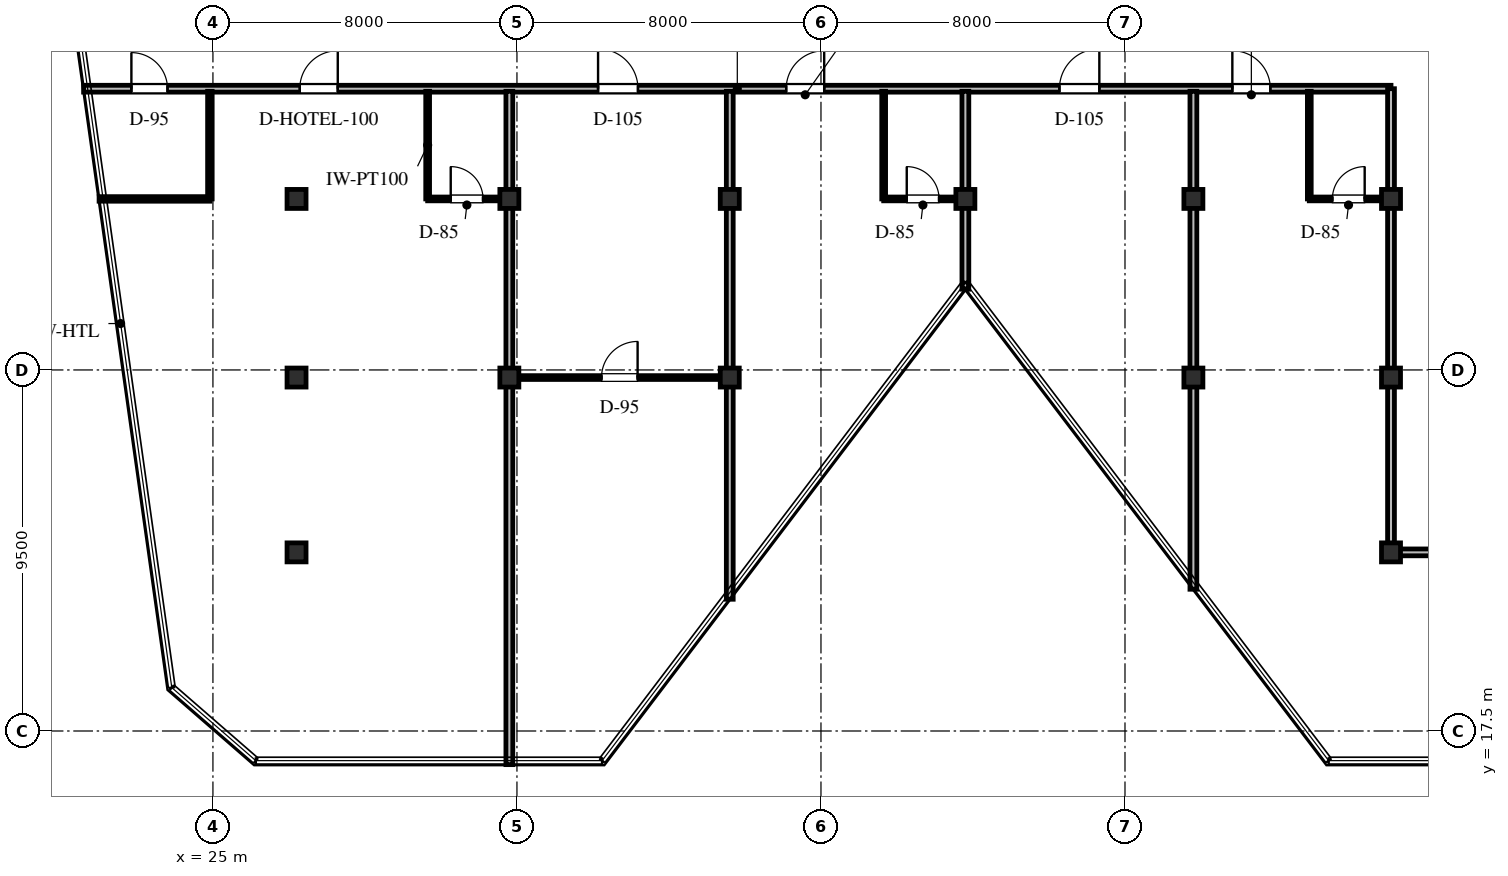
"""IFC4 building model, lengths in metres.
Left out: names, types, materials, properties, quantities, classifications, styles, units other than length and angle.
Written with IfcOpenShell. Run it as: python <this file> out.ifc"""

import sys

from ifc_helpers import new_model, si_unit, direction, frame, frame_2d, origin, origin_2d, place, context, subcontext, project, spatial, rectangle, hollow_rectangle, extrude, element, fill, save


model = new_model("IFC4")
c1 = context("Model", 3, precision=1e-05, world=origin(), true_north=direction((0.0, 1.0)))
c2 = subcontext(c1, "Body", "Model", "MODEL_VIEW")
j1 = project(units=[si_unit("LENGTHUNIT", "METRE"), si_unit("PLANEANGLEUNIT", "RADIAN")], contexts=[c1])
p1 = place(None, origin())
s1 = spatial("IfcSite", under=j1, at=p1, CompositionType="ELEMENT")
p2 = place(p1, origin())
s2 = spatial("IfcBuilding", under=s1, at=p2, CompositionType="ELEMENT")
p3 = place(p2, frame((0.0, 0.0, 234.6)))
s3 = spatial("IfcBuildingStorey", under=s2, at=p3, CompositionType="ELEMENT", Elevation=234.6)
for number, where, z_axis, x_axis in (
    (1, (44.8, 31.5, 0.0), (0.0, 0.0, 1.0), (1.0, 0.0, 0.0)),
    (2, (50.8, 31.5, 0.0), (0.0, 0.0, 1.0), (1.0, 0.0, 0.0)),
    (3, (56.0, 31.5, 0.0), (0.0, 0.0, 1.0), (1.0, 0.0, 0.0)),
    (4, (38.6, 31.5, 0.0), (0.0, 0.0, 1.0), (1.0, 0.0, 0.0)),
    (5, (32.8, 31.5, 0.0), (0.0, 0.0, 1.0), (1.0, 0.0, 0.0)),
    (6, (27.2, 31.5, 0.0), (0.0, 0.0, 1.0), (1.0, 0.0, 0.0)),
    (7, (38.6, 26.8, 0.0), (0.0, 0.0, 1.0), (1.0, 0.0, 0.0)),
    (8, (50.8, 26.8, 0.0), (0.0, 0.0, 1.0), (1.0, 0.0, 0.0)),
    (9, (56.0, 26.8, 0.0), (0.0, 0.0, 1.0), (1.0, 0.0, 0.0)),
    (10, (56.0, 22.2, 0.0), (0.0, 0.0, 1.0), (1.0, 0.0, 0.0)),
    (11, (27.2, 22.2, 0.0), (0.0, 0.0, 1.0), (1.0, 0.0, 0.0)),
    (12, (27.2, 26.8, 0.0), (0.0, 0.0, 1.0), (1.0, 0.0, 0.0)),
    (13, (32.8, 26.8, 0.0), (0.0, 0.0, 1.0), (1.0, 0.0, 0.0)),
):
    element("IfcColumn", number, at=place(p3, frame(where, z_axis=z_axis, x_axis=x_axis)), inside=s3, PredefinedType="COLUMN", context=c2, shape_type="SweptSolid", body=[
        extrude(hollow_rectangle(XDim=0.5, YDim=0.5, WallThickness=0.02, at=origin_2d()), origin(), (0.0, 0.0, 1.0), 3.6),
    ])
p4 = place(p3, frame((21.597, 34.4, 0.0), z_axis=(0.0, 0.0, 1.0), x_axis=(1.0, 0.0, 0.0)))
e14 = element("IfcWall", 14, at=p4, inside=s3, PredefinedType="STANDARD", context=c2, shape_type="SweptSolid", body=[
    extrude(rectangle(XDim=34.403, YDim=0.18, at=frame_2d((17.202, 0.0))), origin(), (0.0, 0.0, 1.0), 2.664),
])
p5 = place(p4, frame((1.258, 0.0, 0.0)))
e15 = element("IfcOpeningElement", 15, at=p5, cuts=e14, PredefinedType="OPENING", context=c2, shape_type="SweptSolid", body=[
    extrude(rectangle(XDim=0.95, YDim=2.15, at=frame_2d((0.475, 1.075))), frame((0.0, 0.1, 0.0), z_axis=(0.0, -1.0, 0.0), x_axis=(1.0, 0.0, 0.0)), (0.0, 0.0, 1.0), 0.2),
])
p6 = place(p4, frame((5.688, 0.0, 0.0)))
e16 = element("IfcOpeningElement", 16, at=p6, cuts=e14, PredefinedType="OPENING", context=c2, shape_type="SweptSolid", body=[
    extrude(rectangle(XDim=1.0, YDim=2.15, at=frame_2d((0.5, 1.075))), frame((0.0, 0.1, 0.0), z_axis=(0.0, -1.0, 0.0), x_axis=(1.0, 0.0, 0.0)), (0.0, 0.0, 1.0), 0.2),
])
p7 = place(p4, frame((13.538, 0.0, 0.0)))
e17 = element("IfcOpeningElement", 17, at=p7, cuts=e14, PredefinedType="OPENING", context=c2, shape_type="SweptSolid", body=[
    extrude(rectangle(XDim=1.05, YDim=2.2, at=frame_2d((0.525, 1.1))), frame((0.0, 0.1, 0.0), z_axis=(0.0, -1.0, 0.0), x_axis=(1.0, 0.0, 0.0)), (0.0, 0.0, 1.0), 0.2),
])
p8 = place(p4, frame((18.488, 0.0, 0.0)))
e18 = element("IfcOpeningElement", 18, at=p8, cuts=e14, PredefinedType="OPENING", context=c2, shape_type="SweptSolid", body=[
    extrude(rectangle(XDim=1.0, YDim=2.15, at=frame_2d((0.5, 1.075))), frame((0.0, 0.1, 0.0), z_axis=(0.0, -1.0, 0.0), x_axis=(1.0, 0.0, 0.0)), (0.0, 0.0, 1.0), 0.2),
])
p9 = place(p4, frame((25.678, 0.0, 0.0)))
e19 = element("IfcOpeningElement", 19, at=p9, cuts=e14, PredefinedType="OPENING", context=c2, shape_type="SweptSolid", body=[
    extrude(rectangle(XDim=1.05, YDim=2.2, at=frame_2d((0.525, 1.1))), frame((0.0, 0.1, 0.0), z_axis=(0.0, -1.0, 0.0), x_axis=(1.0, 0.0, 0.0)), (0.0, 0.0, 1.0), 0.2),
])
p10 = place(p4, frame((30.228, 0.0, 0.0)))
e20 = element("IfcOpeningElement", 20, at=p10, cuts=e14, PredefinedType="OPENING", context=c2, shape_type="SweptSolid", body=[
    extrude(rectangle(XDim=1.0, YDim=2.15, at=frame_2d((0.5, 1.075))), frame((0.0, 0.1, 0.0), z_axis=(0.0, -1.0, 0.0), x_axis=(1.0, 0.0, 0.0)), (0.0, 0.0, 1.0), 0.2),
])
p11 = place(p3, frame((56.0, 22.2, 0.0), z_axis=(0.0, 0.0, 1.0), x_axis=(0.0, 1.0, 0.0)))
e21 = element("IfcWall", 21, at=p11, inside=s3, PredefinedType="STANDARD", context=c2, shape_type="SweptSolid", body=[
    extrude(rectangle(XDim=12.2, YDim=0.18, at=frame_2d((6.1, 0.0))), origin(), (0.0, 0.0, 1.0), 2.664),
])
p12 = place(p3, frame((56.0, 22.2, 0.0), z_axis=(0.0, 0.0, 1.0), x_axis=(1.0, 0.0, 0.0)))
e22 = element("IfcWall", 22, at=p12, inside=s3, PredefinedType="STANDARD", context=c2, shape_type="SweptSolid", body=[
    extrude(rectangle(XDim=2.25, YDim=0.18, at=frame_2d((1.125, 0.0))), origin(), (0.0, 0.0, 1.0), 2.664),
])
p13 = place(p3, frame((24.92, 31.5, 0.0), z_axis=(0.0, 0.0, 1.0), x_axis=(0.0, 1.0, 0.0)))
e23 = element("IfcWall", 23, at=p13, inside=s3, PredefinedType="PARTITIONING", context=c2, shape_type="SweptSolid", body=[
    extrude(rectangle(XDim=2.832, YDim=0.12, at=frame_2d((1.416, 0.0))), origin(), (0.0, 0.0, 1.0), 3.36),
])
p14 = place(p3, frame((22.004, 31.5, 0.0), z_axis=(0.0, 0.0, 1.0), x_axis=(1.0, 0.0, 0.0)))
e24 = element("IfcWall", 24, at=p14, inside=s3, PredefinedType="PARTITIONING", context=c2, shape_type="SweptSolid", body=[
    extrude(rectangle(XDim=2.916, YDim=0.12, at=frame_2d((1.458, 0.0))), origin(), (0.0, 0.0, 1.0), 3.36),
])
p15 = place(p3, frame((30.65, 31.5, 0.0), z_axis=(0.0, 0.0, 1.0), x_axis=(0.0, 1.0, 0.0)))
e25 = element("IfcWall", 25, at=p15, inside=s3, PredefinedType="PARTITIONING", context=c2, shape_type="SweptSolid", body=[
    extrude(rectangle(XDim=2.832, YDim=0.1, at=frame_2d((1.416, 0.0))), origin(), (0.0, 0.0, 1.0), 2.664),
])
p16 = place(p3, frame((30.65, 31.5, 0.0), z_axis=(0.0, 0.0, 1.0), x_axis=(1.0, 0.0, 0.0)))
e26 = element("IfcWall", 26, at=p16, inside=s3, PredefinedType="PARTITIONING", context=c2, shape_type="SweptSolid", body=[
    extrude(rectangle(XDim=2.082, YDim=0.1, at=frame_2d((1.041, 0.0))), origin(), (0.0, 0.0, 1.0), 2.664),
])
p17 = place(p16, frame((0.607, 0.0, 0.0)))
e27 = element("IfcOpeningElement", 27, at=p17, cuts=e26, PredefinedType="OPENING", context=c2, shape_type="SweptSolid", body=[
    extrude(rectangle(XDim=0.85, YDim=2.1, at=frame_2d((0.425, 1.05))), frame((0.0, 0.06, 0.0), z_axis=(0.0, -1.0, 0.0), x_axis=(1.0, 0.0, 0.0)), (0.0, 0.0, 1.0), 0.12),
])
p18 = place(p3, frame((32.8, 16.615, 0.0), z_axis=(0.0, 0.0, 1.0), x_axis=(0.0, 1.0, 0.0)))
e28 = element("IfcWall", 28, at=p18, inside=s3, PredefinedType="STANDARD", context=c2, shape_type="SweptSolid", body=[
    extrude(rectangle(XDim=17.717, YDim=0.18, at=frame_2d((8.858, 0.0))), origin(), (0.0, 0.0, 1.0), 2.664),
])
p19 = place(p3, frame((32.868, 26.8, 0.0), z_axis=(0.0, 0.0, 1.0), x_axis=(1.0, 0.0, 0.0)))
e29 = element("IfcWall", 29, at=p19, inside=s3, PredefinedType="PARTITIONING", context=c2, shape_type="SweptSolid", body=[
    extrude(rectangle(XDim=5.664, YDim=0.1, at=frame_2d((2.832, 0.0))), origin(), (0.0, 0.0, 1.0), 2.664),
])
p20 = place(p19, frame((2.357, 0.0, 0.0)))
e30 = element("IfcOpeningElement", 30, at=p20, cuts=e29, PredefinedType="OPENING", context=c2, shape_type="SweptSolid", body=[
    extrude(rectangle(XDim=0.95, YDim=2.15, at=frame_2d((0.475, 1.075))), frame((0.0, 0.06, 0.0), z_axis=(0.0, -1.0, 0.0), x_axis=(1.0, 0.0, 0.0)), (0.0, 0.0, 1.0), 0.12),
])
p21 = place(p3, frame((38.6, 20.967, 0.0), z_axis=(0.0, 0.0, 1.0), x_axis=(0.0, 1.0, 0.0)))
e31 = element("IfcWall", 31, at=p21, inside=s3, PredefinedType="STANDARD", context=c2, shape_type="SweptSolid", body=[
    extrude(rectangle(XDim=13.365, YDim=0.18, at=frame_2d((6.683, 0.0))), origin(), (0.0, 0.0, 1.0), 2.664),
])
p22 = place(p3, frame((42.65, 31.5, 0.0), z_axis=(0.0, 0.0, 1.0), x_axis=(0.0, 1.0, 0.0)))
e32 = element("IfcWall", 32, at=p22, inside=s3, PredefinedType="PARTITIONING", context=c2, shape_type="SweptSolid", body=[
    extrude(rectangle(XDim=2.832, YDim=0.1, at=frame_2d((1.416, 0.0))), origin(), (0.0, 0.0, 1.0), 2.664),
])
p23 = place(p3, frame((42.65, 31.5, 0.0), z_axis=(0.0, 0.0, 1.0), x_axis=(1.0, 0.0, 0.0)))
e33 = element("IfcWall", 33, at=p23, inside=s3, PredefinedType="PARTITIONING", context=c2, shape_type="SweptSolid", body=[
    extrude(rectangle(XDim=2.082, YDim=0.1, at=frame_2d((1.041, 0.0))), origin(), (0.0, 0.0, 1.0), 2.664),
])
p24 = place(p23, frame((0.607, 0.0, 0.0)))
e34 = element("IfcOpeningElement", 34, at=p24, cuts=e33, PredefinedType="OPENING", context=c2, shape_type="SweptSolid", body=[
    extrude(rectangle(XDim=0.85, YDim=2.1, at=frame_2d((0.425, 1.05))), frame((0.0, 0.06, 0.0), z_axis=(0.0, -1.0, 0.0), x_axis=(1.0, 0.0, 0.0)), (0.0, 0.0, 1.0), 0.12),
])
p25 = place(p3, frame((44.8, 29.125, 0.0), z_axis=(0.0, 0.0, 1.0), x_axis=(0.0, 1.0, 0.0)))
e35 = element("IfcWall", 35, at=p25, inside=s3, PredefinedType="STANDARD", context=c2, shape_type="SweptSolid", body=[
    extrude(rectangle(XDim=5.207, YDim=0.18, at=frame_2d((2.604, 0.0))), origin(), (0.0, 0.0, 1.0), 2.664),
])
p26 = place(p3, frame((50.8, 21.23, 0.0), z_axis=(0.0, 0.0, 1.0), x_axis=(0.0, 1.0, 0.0)))
e36 = element("IfcWall", 36, at=p26, inside=s3, PredefinedType="STANDARD", context=c2, shape_type="SweptSolid", body=[
    extrude(rectangle(XDim=13.102, YDim=0.18, at=frame_2d((6.551, 0.0))), origin(), (0.0, 0.0, 1.0), 2.664),
])
p27 = place(p3, frame((53.85, 31.5, 0.0), z_axis=(0.0, 0.0, 1.0), x_axis=(0.0, 1.0, 0.0)))
e37 = element("IfcWall", 37, at=p27, inside=s3, PredefinedType="PARTITIONING", context=c2, shape_type="SweptSolid", body=[
    extrude(rectangle(XDim=2.832, YDim=0.1, at=frame_2d((1.416, 0.0))), origin(), (0.0, 0.0, 1.0), 2.664),
])
p28 = place(p3, frame((53.85, 31.5, 0.0), z_axis=(0.0, 0.0, 1.0), x_axis=(1.0, 0.0, 0.0)))
e38 = element("IfcWall", 38, at=p28, inside=s3, PredefinedType="PARTITIONING", context=c2, shape_type="SweptSolid", body=[
    extrude(rectangle(XDim=2.082, YDim=0.1, at=frame_2d((1.041, 0.0))), origin(), (0.0, 0.0, 1.0), 2.664),
])
p29 = place(p28, frame((0.607, 0.0, 0.0)))
e39 = element("IfcOpeningElement", 39, at=p29, cuts=e38, PredefinedType="OPENING", context=c2, shape_type="SweptSolid", body=[
    extrude(rectangle(XDim=0.85, YDim=2.1, at=frame_2d((0.425, 1.05))), frame((0.0, 0.06, 0.0), z_axis=(0.0, -1.0, 0.0), x_axis=(1.0, 0.0, 0.0)), (0.0, 0.0, 1.0), 0.12),
])
p30 = place(p5, origin())
e40 = element("IfcDoor", 40, at=p30, inside=s3, OperationType="SINGLE_SWING_LEFT", PredefinedType="DOOR", context=c2, shape_type="SweptSolid", body=[
    extrude(rectangle(XDim=0.95, YDim=2.15, at=frame_2d((0.475, 1.075))), frame((0.0, 0.025, 0.0), z_axis=(0.0, -1.0, 0.0), x_axis=(1.0, 0.0, 0.0)), (0.0, 0.0, 1.0), 0.05),
])
fill(e15, e40)
p31 = place(p6, origin())
e41 = element("IfcDoor", 41, at=p31, inside=s3, OperationType="SINGLE_SWING_RIGHT", PredefinedType="DOOR", context=c2, shape_type="SweptSolid", body=[
    extrude(rectangle(XDim=1.0, YDim=2.15, at=frame_2d((0.5, 1.075))), frame((0.0, 0.025, 0.0), z_axis=(0.0, -1.0, 0.0), x_axis=(1.0, 0.0, 0.0)), (0.0, 0.0, 1.0), 0.05),
])
fill(e16, e41)
p32 = place(p17, origin())
e42 = element("IfcDoor", 42, at=p32, inside=s3, OperationType="SINGLE_SWING_LEFT", PredefinedType="DOOR", context=c2, shape_type="SweptSolid", body=[
    extrude(rectangle(XDim=0.85, YDim=2.1, at=frame_2d((0.425, 1.05))), frame((0.0, 0.025, 0.0), z_axis=(0.0, -1.0, 0.0), x_axis=(1.0, 0.0, 0.0)), (0.0, 0.0, 1.0), 0.05),
])
fill(e27, e42)
p33 = place(p20, origin())
e43 = element("IfcDoor", 43, at=p33, inside=s3, OperationType="SINGLE_SWING_RIGHT", PredefinedType="DOOR", context=c2, shape_type="SweptSolid", body=[
    extrude(rectangle(XDim=0.95, YDim=2.15, at=frame_2d((0.475, 1.075))), frame((0.0, 0.025, 0.0), z_axis=(0.0, -1.0, 0.0), x_axis=(1.0, 0.0, 0.0)), (0.0, 0.0, 1.0), 0.05),
])
fill(e30, e43)
p34 = place(p7, origin())
e44 = element("IfcDoor", 44, at=p34, inside=s3, OperationType="SINGLE_SWING_LEFT", PredefinedType="DOOR", context=c2, shape_type="SweptSolid", body=[
    extrude(rectangle(XDim=1.05, YDim=2.2, at=frame_2d((0.525, 1.1))), frame((0.0, 0.025, 0.0), z_axis=(0.0, -1.0, 0.0), x_axis=(1.0, 0.0, 0.0)), (0.0, 0.0, 1.0), 0.05),
])
fill(e17, e44)
p35 = place(p8, origin())
e45 = element("IfcDoor", 45, at=p35, inside=s3, OperationType="SINGLE_SWING_RIGHT", PredefinedType="DOOR", context=c2, shape_type="SweptSolid", body=[
    extrude(rectangle(XDim=1.0, YDim=2.15, at=frame_2d((0.5, 1.075))), frame((0.0, 0.025, 0.0), z_axis=(0.0, -1.0, 0.0), x_axis=(1.0, 0.0, 0.0)), (0.0, 0.0, 1.0), 0.05),
])
fill(e18, e45)
p36 = place(p24, origin())
e46 = element("IfcDoor", 46, at=p36, inside=s3, OperationType="SINGLE_SWING_LEFT", PredefinedType="DOOR", context=c2, shape_type="SweptSolid", body=[
    extrude(rectangle(XDim=0.85, YDim=2.1, at=frame_2d((0.425, 1.05))), frame((0.0, 0.025, 0.0), z_axis=(0.0, -1.0, 0.0), x_axis=(1.0, 0.0, 0.0)), (0.0, 0.0, 1.0), 0.05),
])
fill(e34, e46)
p37 = place(p9, origin())
e47 = element("IfcDoor", 47, at=p37, inside=s3, OperationType="SINGLE_SWING_RIGHT", PredefinedType="DOOR", context=c2, shape_type="SweptSolid", body=[
    extrude(rectangle(XDim=1.05, YDim=2.2, at=frame_2d((0.525, 1.1))), frame((0.0, 0.025, 0.0), z_axis=(0.0, -1.0, 0.0), x_axis=(1.0, 0.0, 0.0)), (0.0, 0.0, 1.0), 0.05),
])
fill(e19, e47)
p38 = place(p10, origin())
e48 = element("IfcDoor", 48, at=p38, inside=s3, OperationType="SINGLE_SWING_LEFT", PredefinedType="DOOR", context=c2, shape_type="SweptSolid", body=[
    extrude(rectangle(XDim=1.0, YDim=2.15, at=frame_2d((0.5, 1.075))), frame((0.0, 0.025, 0.0), z_axis=(0.0, -1.0, 0.0), x_axis=(1.0, 0.0, 0.0)), (0.0, 0.0, 1.0), 0.05),
])
fill(e20, e48)
p39 = place(p29, origin())
e49 = element("IfcDoor", 49, at=p39, inside=s3, OperationType="SINGLE_SWING_RIGHT", PredefinedType="DOOR", context=c2, shape_type="SweptSolid", body=[
    extrude(rectangle(XDim=0.85, YDim=2.1, at=frame_2d((0.425, 1.05))), frame((0.0, 0.025, 0.0), z_axis=(0.0, -1.0, 0.0), x_axis=(1.0, 0.0, 0.0)), (0.0, 0.0, 1.0), 0.05),
])
fill(e39, e49)
save(model, sys.argv[1])
